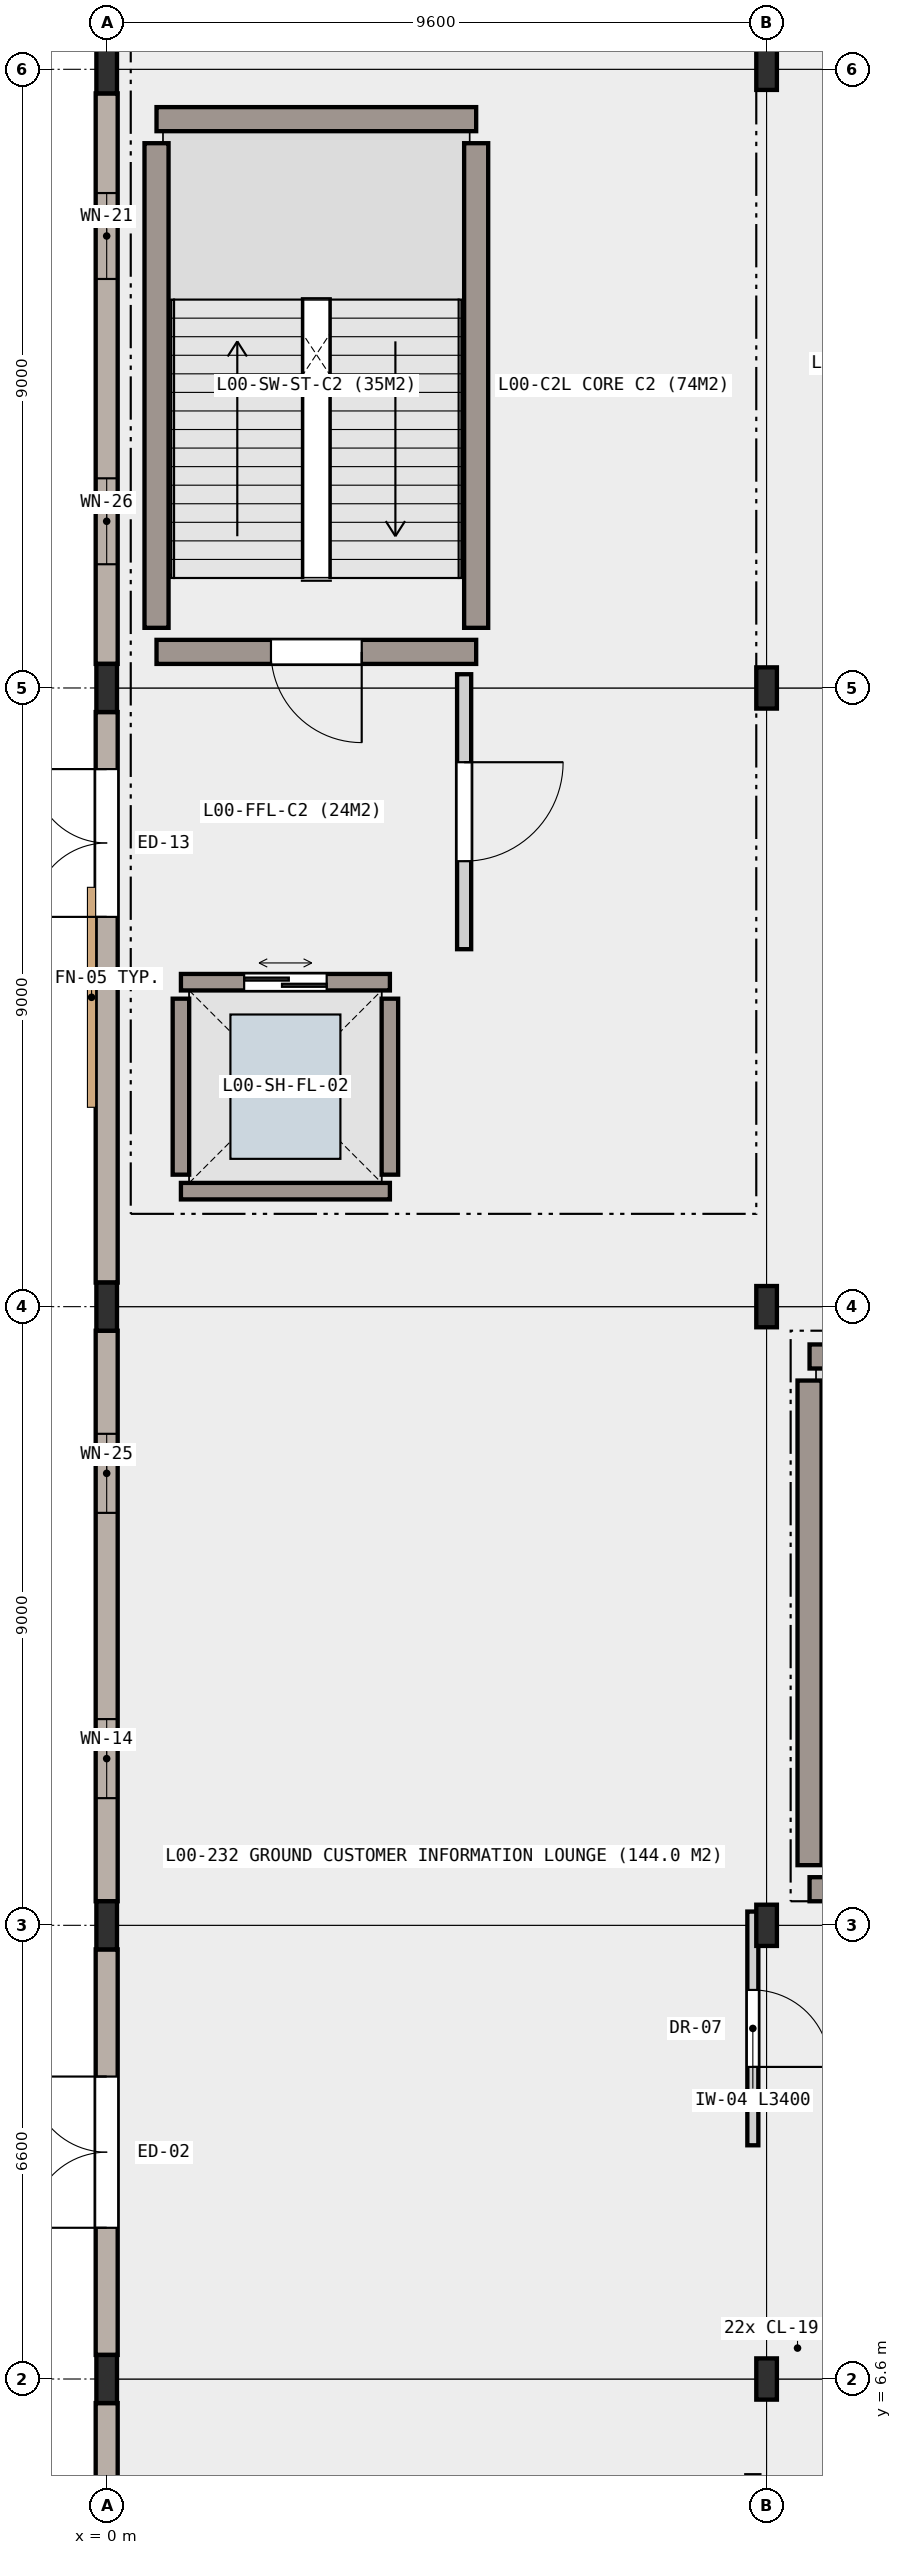
"""IFC4 building model, lengths in metres.
Left out: names, types, materials, properties, quantities, classifications, styles, units other than length and angle.
Written with IfcOpenShell. Run it as: python <this file> out.ifc"""

import sys

from ifc_helpers import new_model, si_unit, direction, frame, frame_2d, origin, origin_2d, place, context, subcontext, project, spatial, rectangle, i_section, extrude, element, fill, save


model = new_model("IFC4")
c1 = context("Model", 3, precision=1e-05, world=origin(), true_north=direction((0.0, 1.0)))
c2 = subcontext(c1, "Body", "Model", "MODEL_VIEW")
j1 = project(units=[si_unit("LENGTHUNIT", "METRE"), si_unit("PLANEANGLEUNIT", "RADIAN")], contexts=[c1])
p1 = place(None, origin())
s1 = spatial("IfcSite", under=j1, at=p1, CompositionType="ELEMENT")
p2 = place(p1, origin())
s2 = spatial("IfcBuilding", under=s1, at=p2, CompositionType="ELEMENT")
p3 = place(p2, origin())
s3 = spatial("IfcBuildingStorey", under=s2, at=p3, CompositionType="ELEMENT", Elevation=0.0)
for number, where, z_axis, x_axis in (
    (1, (0.0, 6.6, 0.0), (0.0, 0.0, 1.0), (1.0, 0.0, 0.0)),
    (2, (0.0, 13.2, 0.0), (0.0, 0.0, 1.0), (1.0, 0.0, 0.0)),
    (3, (0.0, 22.2, 0.0), (0.0, 0.0, 1.0), (1.0, 0.0, 0.0)),
    (4, (0.0, 31.2, 0.0), (0.0, 0.0, 1.0), (1.0, 0.0, 0.0)),
    (5, (0.0, 40.2, 0.0), (0.0, 0.0, 1.0), (1.0, 0.0, 0.0)),
):
    element("IfcColumn", number, at=place(p3, frame(where, z_axis=z_axis, x_axis=x_axis)), inside=s3, PredefinedType="COLUMN", context=c2, shape_type="SweptSolid", body=[
        extrude(i_section(OverallWidth=0.3, OverallDepth=0.7, WebThickness=0.017, FlangeThickness=0.032, FilletRadius=0.027, at=origin_2d()), origin(), (0.0, 0.0, 1.0), 5.4),
    ])
for number, where, z_axis, x_axis in (
    (6, (9.6, 6.6, 0.0), (0.0, 0.0, 1.0), (1.0, 0.0, 0.0)),
    (7, (9.6, 13.2, 0.0), (0.0, 0.0, 1.0), (1.0, 0.0, 0.0)),
    (8, (9.6, 22.2, 0.0), (0.0, 0.0, 1.0), (1.0, 0.0, 0.0)),
    (9, (9.6, 31.2, 0.0), (0.0, 0.0, 1.0), (1.0, 0.0, 0.0)),
    (10, (9.6, 40.2, 0.0), (0.0, 0.0, 1.0), (1.0, 0.0, 0.0)),
):
    element("IfcColumn", number, at=place(p3, frame(where, z_axis=z_axis, x_axis=x_axis)), inside=s3, PredefinedType="COLUMN", context=c2, shape_type="SweptSolid", body=[
        extrude(i_section(OverallWidth=0.3, OverallDepth=0.6, WebThickness=0.015, FlangeThickness=0.03, FilletRadius=0.027, at=origin_2d()), origin(), (0.0, 0.0, 1.0), 5.4),
    ])
p4 = place(p3, frame((0.0, 0.35, 0.0), z_axis=(0.0, 0.0, 1.0), x_axis=(0.0, 1.0, 0.0)))
e11 = element("IfcWall", 11, at=p4, inside=s3, PredefinedType="SOLIDWALL", context=c2, shape_type="SweptSolid", body=[
    extrude(rectangle(XDim=5.9, YDim=0.32, at=frame_2d((2.95, 0.0))), origin(), (0.0, 0.0, 1.0), 4.69),
])
p5 = place(p4, frame((2.375, 0.0, 0.85)))
e12 = element("IfcOpeningElement", 12, at=p5, cuts=e11, PredefinedType="OPENING", context=c2, shape_type="SweptSolid", body=[
    extrude(rectangle(XDim=1.15, YDim=1.5, at=frame_2d((0.575, 0.75))), frame((0.0, 0.17, 0.0), z_axis=(0.0, -1.0, 0.0), x_axis=(1.0, 0.0, 0.0)), (0.0, 0.0, 1.0), 0.34),
])
p6 = place(p3, frame((0.0, 6.95, 0.0), z_axis=(0.0, 0.0, 1.0), x_axis=(0.0, 1.0, 0.0)))
e13 = element("IfcWall", 13, at=p6, inside=s3, PredefinedType="SOLIDWALL", context=c2, shape_type="SweptSolid", body=[
    extrude(rectangle(XDim=5.9, YDim=0.32, at=frame_2d((2.95, 0.0))), origin(), (0.0, 0.0, 1.0), 4.69),
])
p7 = place(p6, frame((1.85, 0.0, 0.0)))
e14 = element("IfcOpeningElement", 14, at=p7, cuts=e13, PredefinedType="OPENING", context=c2, shape_type="SweptSolid", body=[
    extrude(rectangle(XDim=2.2, YDim=2.55, at=frame_2d((1.1, 1.275))), frame((0.0, 0.17, 0.0), z_axis=(0.0, -1.0, 0.0), x_axis=(1.0, 0.0, 0.0)), (0.0, 0.0, 1.0), 0.34),
])
p8 = place(p3, frame((0.0, 13.55, 0.0), z_axis=(0.0, 0.0, 1.0), x_axis=(0.0, 1.0, 0.0)))
e15 = element("IfcWall", 15, at=p8, inside=s3, PredefinedType="SOLIDWALL", context=c2, shape_type="SweptSolid", body=[
    extrude(rectangle(XDim=8.3, YDim=0.32, at=frame_2d((4.15, 0.0))), origin(), (0.0, 0.0, 1.0), 4.69),
])
p9 = place(p8, frame((1.5, 0.0, 0.85)))
e16 = element("IfcOpeningElement", 16, at=p9, cuts=e15, PredefinedType="OPENING", context=c2, shape_type="SweptSolid", body=[
    extrude(rectangle(XDim=1.15, YDim=1.85, at=frame_2d((0.575, 0.925))), frame((0.0, 0.17, 0.0), z_axis=(0.0, -1.0, 0.0), x_axis=(1.0, 0.0, 0.0)), (0.0, 0.0, 1.0), 0.34),
])
p10 = place(p8, frame((5.65, 0.0, 0.85)))
e17 = element("IfcOpeningElement", 17, at=p10, cuts=e15, PredefinedType="OPENING", context=c2, shape_type="SweptSolid", body=[
    extrude(rectangle(XDim=1.15, YDim=2.15, at=frame_2d((0.575, 1.075))), frame((0.0, 0.17, 0.0), z_axis=(0.0, -1.0, 0.0), x_axis=(1.0, 0.0, 0.0)), (0.0, 0.0, 1.0), 0.34),
])
p11 = place(p3, frame((0.0, 22.55, 0.0), z_axis=(0.0, 0.0, 1.0), x_axis=(0.0, 1.0, 0.0)))
e18 = element("IfcWall", 18, at=p11, inside=s3, PredefinedType="SOLIDWALL", context=c2, shape_type="SweptSolid", body=[
    extrude(rectangle(XDim=8.3, YDim=0.32, at=frame_2d((4.15, 0.0))), origin(), (0.0, 0.0, 1.0), 4.69),
])
p12 = place(p11, frame((5.32, 0.0, 0.0)))
e19 = element("IfcOpeningElement", 19, at=p12, cuts=e18, PredefinedType="OPENING", context=c2, shape_type="SweptSolid", body=[
    extrude(rectangle(XDim=2.15, YDim=2.5, at=frame_2d((1.075, 1.25))), frame((0.0, 0.17, 0.0), z_axis=(0.0, -1.0, 0.0), x_axis=(1.0, 0.0, 0.0)), (0.0, 0.0, 1.0), 0.34),
])
p13 = place(p3, frame((0.0, 31.55, 0.0), z_axis=(0.0, 0.0, 1.0), x_axis=(0.0, 1.0, 0.0)))
e20 = element("IfcWall", 20, at=p13, inside=s3, PredefinedType="SOLIDWALL", context=c2, shape_type="SweptSolid", body=[
    extrude(rectangle(XDim=8.3, YDim=0.32, at=frame_2d((4.15, 0.0))), origin(), (0.0, 0.0, 1.0), 4.69),
])
p14 = place(p13, frame((1.45, 0.0, 0.85)))
e21 = element("IfcOpeningElement", 21, at=p14, cuts=e20, PredefinedType="OPENING", context=c2, shape_type="SweptSolid", body=[
    extrude(rectangle(XDim=1.25, YDim=1.5, at=frame_2d((0.625, 0.75))), frame((0.0, 0.17, 0.0), z_axis=(0.0, -1.0, 0.0), x_axis=(1.0, 0.0, 0.0)), (0.0, 0.0, 1.0), 0.34),
])
p15 = place(p13, frame((5.6, 0.0, 0.85)))
e22 = element("IfcOpeningElement", 22, at=p15, cuts=e20, PredefinedType="OPENING", context=c2, shape_type="SweptSolid", body=[
    extrude(rectangle(XDim=1.25, YDim=1.85, at=frame_2d((0.625, 0.925))), frame((0.0, 0.17, 0.0), z_axis=(0.0, -1.0, 0.0), x_axis=(1.0, 0.0, 0.0)), (0.0, 0.0, 1.0), 0.34),
])
p16 = place(p3, frame((4.12, 23.88, 0.0), z_axis=(0.0, 0.0, 1.0), x_axis=(-1.0, 0.0, 0.0)))
e23 = element("IfcWall", 23, at=p16, inside=s3, PredefinedType="SHEAR", context=c2, shape_type="SweptSolid", body=[
    extrude(rectangle(XDim=3.04, YDim=0.24, at=frame_2d((1.52, 0.0))), origin(), (0.0, 0.0, 1.0), 5.12),
])
p17 = place(p3, frame((1.08, 26.92, 0.0), z_axis=(0.0, 0.0, 1.0), x_axis=(1.0, 0.0, 0.0)))
e24 = element("IfcWall", 24, at=p17, inside=s3, PredefinedType="SHEAR", context=c2, shape_type="SweptSolid", body=[
    extrude(rectangle(XDim=3.04, YDim=0.24, at=frame_2d((1.52, 0.0))), origin(), (0.0, 0.0, 1.0), 5.12),
])
p18 = place(p17, frame((0.92, 0.0, 0.0)))
e25 = element("IfcOpeningElement", 25, at=p18, cuts=e24, PredefinedType="OPENING", context=c2, shape_type="SweptSolid", body=[
    extrude(rectangle(XDim=1.2, YDim=2.15, at=frame_2d((0.6, 1.075))), frame((0.0, 0.13, 0.0), z_axis=(0.0, -1.0, 0.0), x_axis=(1.0, 0.0, 0.0)), (0.0, 0.0, 1.0), 0.26),
])
for number, where, z_axis, x_axis in (
    (26, (1.08, 24.12, 0.0), (0.0, 0.0, 1.0), (0.0, 1.0, 0.0)),
    (27, (4.12, 26.68, 0.0), (0.0, 0.0, 1.0), (0.0, -1.0, 0.0)),
):
    element("IfcWall", number, at=place(p3, frame(where, z_axis=z_axis, x_axis=x_axis)), inside=s3, PredefinedType="SHEAR", context=c2, shape_type="SweptSolid", body=[
        extrude(rectangle(XDim=2.56, YDim=0.24, at=frame_2d((1.28, 0.0))), origin(), (0.0, 0.0, 1.0), 5.12),
    ])
p19 = place(p3, frame((14.875, 13.725, 0.0), z_axis=(0.0, 0.0, 1.0), x_axis=(-1.0, 0.0, 0.0)))
e28 = element("IfcWall", 28, at=p19, inside=s3, PredefinedType="SHEAR", context=c2, shape_type="SweptSolid", body=[
    extrude(rectangle(XDim=4.65, YDim=0.35, at=frame_2d((2.325, 0.0))), origin(), (0.0, 0.0, 1.0), 5.12),
])
p20 = place(p19, frame((1.665, 0.0, 0.0)))
e29 = element("IfcOpeningElement", 29, at=p20, cuts=e28, PredefinedType="OPENING", context=c2, shape_type="SweptSolid", body=[
    extrude(rectangle(XDim=1.32, YDim=2.15, at=frame_2d((0.66, 1.075))), frame((0.0, 0.185, 0.0), z_axis=(0.0, -1.0, 0.0), x_axis=(1.0, 0.0, 0.0)), (0.0, 0.0, 1.0), 0.37),
])
p21 = place(p3, frame((10.225, 21.475, 0.0), z_axis=(0.0, 0.0, 1.0), x_axis=(1.0, 0.0, 0.0)))
e30 = element("IfcWall", 30, at=p21, inside=s3, PredefinedType="SHEAR", context=c2, shape_type="SweptSolid", body=[
    extrude(rectangle(XDim=4.825, YDim=0.35, at=frame_2d((2.413, 0.0))), origin(), (0.0, 0.0, 1.0), 5.12),
])
p22 = place(p3, frame((10.225, 14.075, 0.0), z_axis=(0.0, 0.0, 1.0), x_axis=(0.0, 1.0, 0.0)))
e31 = element("IfcWall", 31, at=p22, inside=s3, PredefinedType="SHEAR", context=c2, shape_type="SweptSolid", body=[
    extrude(rectangle(XDim=7.05, YDim=0.35, at=frame_2d((3.525, 0.0))), origin(), (0.0, 0.0, 1.0), 5.12),
])
p23 = place(p3, frame((5.375, 31.725, 0.0), z_axis=(0.0, 0.0, 1.0), x_axis=(-1.0, 0.0, 0.0)))
e32 = element("IfcWall", 32, at=p23, inside=s3, PredefinedType="SHEAR", context=c2, shape_type="SweptSolid", body=[
    extrude(rectangle(XDim=4.65, YDim=0.35, at=frame_2d((2.325, 0.0))), origin(), (0.0, 0.0, 1.0), 5.12),
])
p24 = place(p23, frame((1.665, 0.0, 0.0)))
e33 = element("IfcOpeningElement", 33, at=p24, cuts=e32, PredefinedType="OPENING", context=c2, shape_type="SweptSolid", body=[
    extrude(rectangle(XDim=1.32, YDim=2.15, at=frame_2d((0.66, 1.075))), frame((0.0, 0.185, 0.0), z_axis=(0.0, -1.0, 0.0), x_axis=(1.0, 0.0, 0.0)), (0.0, 0.0, 1.0), 0.37),
])
p25 = place(p3, frame((0.725, 39.475, 0.0), z_axis=(0.0, 0.0, 1.0), x_axis=(1.0, 0.0, 0.0)))
e34 = element("IfcWall", 34, at=p25, inside=s3, PredefinedType="SHEAR", context=c2, shape_type="SweptSolid", body=[
    extrude(rectangle(XDim=4.65, YDim=0.35, at=frame_2d((2.325, 0.0))), origin(), (0.0, 0.0, 1.0), 5.12),
])
for number, where, z_axis, x_axis in (
    (35, (0.725, 32.075, 0.0), (0.0, 0.0, 1.0), (0.0, 1.0, 0.0)),
    (36, (5.375, 39.125, 0.0), (0.0, 0.0, 1.0), (0.0, -1.0, 0.0)),
):
    element("IfcWall", number, at=place(p3, frame(where, z_axis=z_axis, x_axis=x_axis)), inside=s3, PredefinedType="SHEAR", context=c2, shape_type="SweptSolid", body=[
        extrude(rectangle(XDim=7.05, YDim=0.35, at=frame_2d((3.525, 0.0))), origin(), (0.0, 0.0, 1.0), 5.12),
    ])
p26 = place(p3, frame((5.2, 31.4, 0.0), z_axis=(0.0, 0.0, 1.0), x_axis=(0.0, -1.0, 0.0)))
e37 = element("IfcWall", 37, at=p26, inside=s3, PredefinedType="PARTITIONING", context=c2, shape_type="SweptSolid", body=[
    extrude(rectangle(XDim=4.0, YDim=0.205, at=frame_2d((2.0, 0.0))), origin(), (0.0, 0.0, 1.0), 5.12),
])
p27 = place(p26, frame((1.28, 0.0, 0.0)))
e38 = element("IfcOpeningElement", 38, at=p27, cuts=e37, PredefinedType="OPENING", context=c2, shape_type="SweptSolid", body=[
    extrude(rectangle(XDim=1.44, YDim=2.18, at=frame_2d((0.72, 1.09))), frame((0.0, 0.113, 0.0), z_axis=(0.0, -1.0, 0.0), x_axis=(1.0, 0.0, 0.0)), (0.0, 0.0, 1.0), 0.225),
])
p28 = place(p3, frame((9.4, 13.4, 0.0), z_axis=(0.0, 0.0, 1.0), x_axis=(0.0, -1.0, 0.0)))
e39 = element("IfcWall", 39, at=p28, inside=s3, PredefinedType="PARTITIONING", context=c2, shape_type="SweptSolid", body=[
    extrude(rectangle(XDim=3.4, YDim=0.16, at=frame_2d((1.7, 0.0))), origin(), (0.0, 0.0, 1.0), 4.59),
])
p29 = place(p28, frame((1.14, 0.0, 0.0)))
e40 = element("IfcOpeningElement", 40, at=p29, cuts=e39, PredefinedType="OPENING", context=c2, shape_type="SweptSolid", body=[
    extrude(rectangle(XDim=1.12, YDim=2.15, at=frame_2d((0.56, 1.075))), frame((0.0, 0.09, 0.0), z_axis=(0.0, -1.0, 0.0), x_axis=(1.0, 0.0, 0.0)), (0.0, 0.0, 1.0), 0.18),
])
p30 = place(p7, origin())
e41 = element("IfcDoor", 41, at=p30, inside=s3, OperationType="DOUBLE_DOOR_SINGLE_SWING", PredefinedType="DOOR", context=c2, shape_type="SweptSolid", body=[
    extrude(rectangle(XDim=2.2, YDim=2.55, at=frame_2d((1.1, 1.275))), frame((0.0, 0.025, 0.0), z_axis=(0.0, -1.0, 0.0), x_axis=(1.0, 0.0, 0.0)), (0.0, 0.0, 1.0), 0.05),
])
fill(e14, e41)
p31 = place(p9, origin())
e42 = element("IfcWindow", 42, at=p31, inside=s3, PartitioningType="SINGLE_PANEL", PredefinedType="WINDOW", context=c2, shape_type="SweptSolid", body=[
    extrude(rectangle(XDim=1.15, YDim=1.85, at=frame_2d((0.575, 0.925))), frame((0.0, 0.03, 0.0), z_axis=(0.0, -1.0, 0.0), x_axis=(1.0, 0.0, 0.0)), (0.0, 0.0, 1.0), 0.06),
])
fill(e16, e42)
p32 = place(p10, origin())
e43 = element("IfcWindow", 43, at=p32, inside=s3, PartitioningType="SINGLE_PANEL", PredefinedType="WINDOW", context=c2, shape_type="SweptSolid", body=[
    extrude(rectangle(XDim=1.15, YDim=2.15, at=frame_2d((0.575, 1.075))), frame((0.0, 0.03, 0.0), z_axis=(0.0, -1.0, 0.0), x_axis=(1.0, 0.0, 0.0)), (0.0, 0.0, 1.0), 0.06),
])
fill(e17, e43)
p33 = place(p12, origin())
e44 = element("IfcDoor", 44, at=p33, inside=s3, OperationType="DOUBLE_DOOR_SINGLE_SWING", PredefinedType="DOOR", context=c2, shape_type="SweptSolid", body=[
    extrude(rectangle(XDim=2.15, YDim=2.5, at=frame_2d((1.075, 1.25))), frame((0.0, 0.025, 0.0), z_axis=(0.0, -1.0, 0.0), x_axis=(1.0, 0.0, 0.0)), (0.0, 0.0, 1.0), 0.05),
])
fill(e19, e44)
p34 = place(p14, origin())
e45 = element("IfcWindow", 45, at=p34, inside=s3, PartitioningType="SINGLE_PANEL", PredefinedType="WINDOW", context=c2, shape_type="SweptSolid", body=[
    extrude(rectangle(XDim=1.25, YDim=1.5, at=frame_2d((0.625, 0.75))), frame((0.0, 0.03, 0.0), z_axis=(0.0, -1.0, 0.0), x_axis=(1.0, 0.0, 0.0)), (0.0, 0.0, 1.0), 0.06),
])
fill(e21, e45)
p35 = place(p15, origin())
e46 = element("IfcWindow", 46, at=p35, inside=s3, PartitioningType="SINGLE_PANEL", PredefinedType="WINDOW", context=c2, shape_type="SweptSolid", body=[
    extrude(rectangle(XDim=1.25, YDim=1.85, at=frame_2d((0.625, 0.925))), frame((0.0, 0.03, 0.0), z_axis=(0.0, -1.0, 0.0), x_axis=(1.0, 0.0, 0.0)), (0.0, 0.0, 1.0), 0.06),
])
fill(e22, e46)
p36 = place(p18, origin())
e47 = element("IfcDoor", 47, at=p36, inside=s3, OperationType="DOUBLE_DOOR_SLIDING", PredefinedType="DOOR", context=c2, shape_type="SweptSolid", body=[
    extrude(rectangle(XDim=1.2, YDim=2.15, at=frame_2d((0.6, 1.075))), frame((0.0, 0.025, 0.0), z_axis=(0.0, -1.0, 0.0), x_axis=(1.0, 0.0, 0.0)), (0.0, 0.0, 1.0), 0.05),
])
fill(e25, e47)
p37 = place(p24, origin())
e48 = element("IfcDoor", 48, at=p37, inside=s3, OperationType="SINGLE_SWING_LEFT", PredefinedType="DOOR", context=c2, shape_type="SweptSolid", body=[
    extrude(rectangle(XDim=1.32, YDim=2.15, at=frame_2d((0.66, 1.075))), frame((0.0, 0.025, 0.0), z_axis=(0.0, -1.0, 0.0), x_axis=(1.0, 0.0, 0.0)), (0.0, 0.0, 1.0), 0.05),
])
fill(e33, e48)
p38 = place(p27, origin())
e49 = element("IfcDoor", 49, at=p38, inside=s3, OperationType="SINGLE_SWING_LEFT", PredefinedType="DOOR", context=c2, shape_type="SweptSolid", body=[
    extrude(rectangle(XDim=1.44, YDim=2.18, at=frame_2d((0.72, 1.09))), frame((0.0, 0.025, 0.0), z_axis=(0.0, -1.0, 0.0), x_axis=(1.0, 0.0, 0.0)), (0.0, 0.0, 1.0), 0.05),
])
fill(e38, e49)
p39 = place(p29, origin())
e50 = element("IfcDoor", 50, at=p39, inside=s3, OperationType="SINGLE_SWING_RIGHT", PredefinedType="DOOR", context=c2, shape_type="SweptSolid", body=[
    extrude(rectangle(XDim=1.12, YDim=2.15, at=frame_2d((0.56, 1.075))), frame((0.0, 0.025, 0.0), z_axis=(0.0, -1.0, 0.0), x_axis=(1.0, 0.0, 0.0)), (0.0, 0.0, 1.0), 0.05),
])
fill(e40, e50)
save(model, sys.argv[1])
